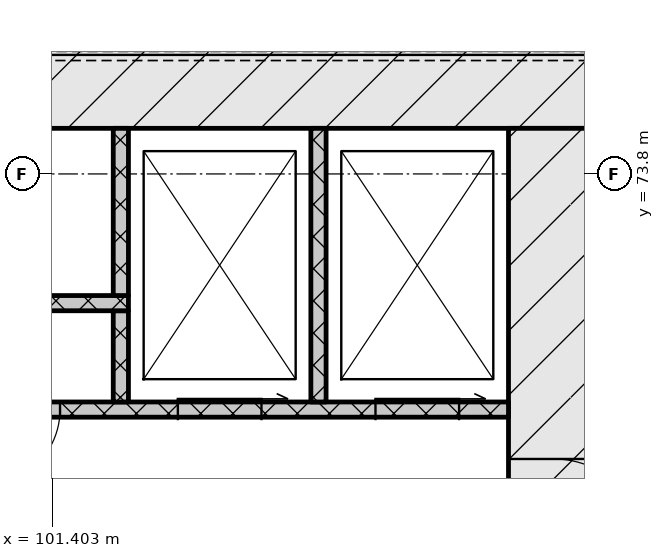
"""IFC4 building model, lengths in metres.
Left out: names, types, materials, properties, quantities, classifications, styles, units other than length and angle.
Written with IfcOpenShell. Run it as: python <this file> out.ifc"""

import sys

from ifc_helpers import new_model, si_unit, direction, frame, frame_2d, origin, place, context, subcontext, project, spatial, rectangle, extrude, element, fill, save


model = new_model("IFC4")
c1 = context("Model", 3, precision=1e-05, world=origin(), true_north=direction((0.0, 1.0)))
c2 = subcontext(c1, "Body", "Model", "MODEL_VIEW")
j1 = project(units=[si_unit("LENGTHUNIT", "METRE"), si_unit("PLANEANGLEUNIT", "RADIAN")], contexts=[c1])
p1 = place(None, origin())
s1 = spatial("IfcSite", under=j1, at=p1, CompositionType="ELEMENT")
p2 = place(p1, origin())
s2 = spatial("IfcBuilding", under=s1, at=p2, CompositionType="ELEMENT")
p3 = place(p2, frame((0.0, 0.0, 44.4)))
s3 = spatial("IfcBuildingStorey", under=s2, at=p3, CompositionType="ELEMENT", Elevation=44.4)
p4 = place(p3, frame((66.6, 75.0, 0.0), z_axis=(0.0, 0.0, 1.0), x_axis=(1.0, 0.0, 0.0)))
e1 = element("IfcWall", 1, at=p4, inside=s3, PredefinedType="SOLIDWALL", context=c2, shape_type="SweptSolid", body=[
    extrude(rectangle(XDim=42.0, YDim=1.2, at=frame_2d((21.0, 0.0))), origin(), (0.0, 0.0, 1.0), 3.32),
])
p5 = place(p3, frame((108.0, 62.4, 0.0), z_axis=(0.0, 0.0, 1.0), x_axis=(0.0, 1.0, 0.0)))
e2 = element("IfcWall", 2, at=p5, inside=s3, PredefinedType="SOLIDWALL", context=c2, shape_type="SweptSolid", body=[
    extrude(rectangle(XDim=12.0, YDim=1.2, at=frame_2d((6.0, 0.0))), origin(), (0.0, 0.0, 1.0), 3.32),
])
p6 = place(p5, frame((6.45, 0.0, 0.0)))
e3 = element("IfcOpeningElement", 3, at=p6, cuts=e2, PredefinedType="OPENING", context=c2, shape_type="SweptSolid", body=[
    extrude(rectangle(XDim=1.2, YDim=2.1, at=frame_2d((0.6, 1.05))), frame((0.0, 0.61, 0.0), z_axis=(0.0, -1.0, 0.0), x_axis=(1.0, 0.0, 0.0)), (0.0, 0.0, 1.0), 1.22),
])
p7 = place(p3, frame((67.8, 70.7, 0.0), z_axis=(0.0, 0.0, 1.0), x_axis=(1.0, 0.0, 0.0)))
e4 = element("IfcWall", 4, at=p7, inside=s3, PredefinedType="SOLIDWALL", context=c2, shape_type="SweptSolid", body=[
    extrude(rectangle(XDim=39.6, YDim=0.2, at=frame_2d((19.8, 0.0))), origin(), (0.0, 0.0, 1.0), 3.32),
])
p8 = place(p7, frame((0.65, 0.0, 0.0)))
e5 = element("IfcOpeningElement", 5, at=p8, cuts=e4, PredefinedType="OPENING", context=c2, shape_type="SweptSolid", body=[
    extrude(rectangle(XDim=1.1, YDim=2.1, at=frame_2d((0.55, 1.05))), frame((0.0, 0.11, 0.0), z_axis=(0.0, -1.0, 0.0), x_axis=(1.0, 0.0, 0.0)), (0.0, 0.0, 1.0), 0.22),
])
p9 = place(p7, frame((3.25, 0.0, 0.0)))
e6 = element("IfcOpeningElement", 6, at=p9, cuts=e4, PredefinedType="OPENING", context=c2, shape_type="SweptSolid", body=[
    extrude(rectangle(XDim=1.1, YDim=2.1, at=frame_2d((0.55, 1.05))), frame((0.0, 0.11, 0.0), z_axis=(0.0, -1.0, 0.0), x_axis=(1.0, 0.0, 0.0)), (0.0, 0.0, 1.0), 0.22),
])
p10 = place(p7, frame((5.9, 0.0, 0.0)))
e7 = element("IfcOpeningElement", 7, at=p10, cuts=e4, PredefinedType="OPENING", context=c2, shape_type="SweptSolid", body=[
    extrude(rectangle(XDim=1.0, YDim=2.1, at=frame_2d((0.5, 1.05))), frame((0.0, 0.11, 0.0), z_axis=(0.0, -1.0, 0.0), x_axis=(1.0, 0.0, 0.0)), (0.0, 0.0, 1.0), 0.22),
])
p11 = place(p7, frame((21.7, 0.0, 0.0)))
e8 = element("IfcOpeningElement", 8, at=p11, cuts=e4, PredefinedType="OPENING", context=c2, shape_type="SweptSolid", body=[
    extrude(rectangle(XDim=1.0, YDim=2.1, at=frame_2d((0.5, 1.05))), frame((0.0, 0.11, 0.0), z_axis=(0.0, -1.0, 0.0), x_axis=(1.0, 0.0, 0.0)), (0.0, 0.0, 1.0), 0.22),
])
p12 = place(p7, frame((32.7, 0.0, 0.0)))
e9 = element("IfcOpeningElement", 9, at=p12, cuts=e4, PredefinedType="OPENING", context=c2, shape_type="SweptSolid", body=[
    extrude(rectangle(XDim=1.0, YDim=2.1, at=frame_2d((0.5, 1.05))), frame((0.0, 0.11, 0.0), z_axis=(0.0, -1.0, 0.0), x_axis=(1.0, 0.0, 0.0)), (0.0, 0.0, 1.0), 0.22),
])
p13 = place(p7, frame((35.25, 0.0, 0.0)))
e10 = element("IfcOpeningElement", 10, at=p13, cuts=e4, PredefinedType="OPENING", context=c2, shape_type="SweptSolid", body=[
    extrude(rectangle(XDim=1.1, YDim=2.1, at=frame_2d((0.55, 1.05))), frame((0.0, 0.11, 0.0), z_axis=(0.0, -1.0, 0.0), x_axis=(1.0, 0.0, 0.0)), (0.0, 0.0, 1.0), 0.22),
])
p14 = place(p7, frame((37.85, 0.0, 0.0)))
e11 = element("IfcOpeningElement", 11, at=p14, cuts=e4, PredefinedType="OPENING", context=c2, shape_type="SweptSolid", body=[
    extrude(rectangle(XDim=1.1, YDim=2.1, at=frame_2d((0.55, 1.05))), frame((0.0, 0.11, 0.0), z_axis=(0.0, -1.0, 0.0), x_axis=(1.0, 0.0, 0.0)), (0.0, 0.0, 1.0), 0.22),
])
p15 = place(p3, frame((102.3, 70.8, 0.0), z_axis=(0.0, 0.0, 1.0), x_axis=(0.0, 1.0, 0.0)))
e12 = element("IfcWall", 12, at=p15, inside=s3, PredefinedType="SOLIDWALL", context=c2, shape_type="SweptSolid", body=[
    extrude(rectangle(XDim=1.2, YDim=0.2, at=frame_2d((0.6, 0.0))), origin(), (0.0, 0.0, 1.0), 3.32),
])
p16 = place(p3, frame((104.9, 70.8, 0.0), z_axis=(0.0, 0.0, 1.0), x_axis=(0.0, 1.0, 0.0)))
e13 = element("IfcWall", 13, at=p16, inside=s3, PredefinedType="SOLIDWALL", context=c2, shape_type="SweptSolid", body=[
    extrude(rectangle(XDim=3.6, YDim=0.2, at=frame_2d((1.8, 0.0))), origin(), (0.0, 0.0, 1.0), 3.32),
])
p17 = place(p3, frame((93.28, 72.1, 0.0), z_axis=(0.0, 0.0, 1.0), x_axis=(1.0, 0.0, 0.0)))
e14 = element("IfcWall", 14, at=p17, inside=s3, PredefinedType="SOLIDWALL", context=c2, shape_type="SweptSolid", body=[
    extrude(rectangle(XDim=9.12, YDim=0.2, at=frame_2d((4.56, 0.0))), origin(), (0.0, 0.0, 1.0), 3.32),
])
p18 = place(p17, frame((0.87, 0.0, 0.0)))
e15 = element("IfcOpeningElement", 15, at=p18, cuts=e14, PredefinedType="OPENING", context=c2, shape_type="SweptSolid", body=[
    extrude(rectangle(XDim=0.9, YDim=2.1, at=frame_2d((0.45, 1.05))), frame((0.0, 0.11, 0.0), z_axis=(0.0, -1.0, 0.0), x_axis=(1.0, 0.0, 0.0)), (0.0, 0.0, 1.0), 0.22),
])
p19 = place(p17, frame((3.73, 0.0, 0.0)))
e16 = element("IfcOpeningElement", 16, at=p19, cuts=e14, PredefinedType="OPENING", context=c2, shape_type="SweptSolid", body=[
    extrude(rectangle(XDim=0.9, YDim=2.1, at=frame_2d((0.45, 1.05))), frame((0.0, 0.11, 0.0), z_axis=(0.0, -1.0, 0.0), x_axis=(1.0, 0.0, 0.0)), (0.0, 0.0, 1.0), 0.22),
])
p20 = place(p17, frame((6.97, 0.0, 0.0)))
e17 = element("IfcOpeningElement", 17, at=p20, cuts=e14, PredefinedType="OPENING", context=c2, shape_type="SweptSolid", body=[
    extrude(rectangle(XDim=0.9, YDim=2.1, at=frame_2d((0.45, 1.05))), frame((0.0, 0.11, 0.0), z_axis=(0.0, -1.0, 0.0), x_axis=(1.0, 0.0, 0.0)), (0.0, 0.0, 1.0), 0.22),
])
p21 = place(p3, frame((102.3, 72.2, 0.0), z_axis=(0.0, 0.0, 1.0), x_axis=(0.0, 1.0, 0.0)))
e18 = element("IfcWall", 18, at=p21, inside=s3, PredefinedType="SOLIDWALL", context=c2, shape_type="SweptSolid", body=[
    extrude(rectangle(XDim=2.2, YDim=0.2, at=frame_2d((1.1, 0.0))), origin(), (0.0, 0.0, 1.0), 3.32),
])
p22 = place(p6, origin())
e19 = element("IfcDoor", 19, at=p22, inside=s3, OperationType="SINGLE_SWING_RIGHT", PredefinedType="DOOR", context=c2, shape_type="SweptSolid", body=[
    extrude(rectangle(XDim=1.2, YDim=2.1, at=frame_2d((0.6, 1.05))), frame((0.0, 0.025, 0.0), z_axis=(0.0, -1.0, 0.0), x_axis=(1.0, 0.0, 0.0)), (0.0, 0.0, 1.0), 0.05),
])
fill(e3, e19)
p23 = place(p12, origin())
e20 = element("IfcDoor", 20, at=p23, inside=s3, OperationType="SINGLE_SWING_RIGHT", PredefinedType="DOOR", context=c2, shape_type="SweptSolid", body=[
    extrude(rectangle(XDim=1.0, YDim=2.1, at=frame_2d((0.5, 1.05))), frame((0.0, 0.025, 0.0), z_axis=(0.0, -1.0, 0.0), x_axis=(1.0, 0.0, 0.0)), (0.0, 0.0, 1.0), 0.05),
])
fill(e9, e20)
p24 = place(p13, origin())
e21 = element("IfcDoor", 21, at=p24, inside=s3, OperationType="SLIDING_TO_RIGHT", PredefinedType="DOOR", context=c2, shape_type="SweptSolid", body=[
    extrude(rectangle(XDim=1.1, YDim=2.1, at=frame_2d((0.55, 1.05))), frame((0.0, 0.025, 0.0), z_axis=(0.0, -1.0, 0.0), x_axis=(1.0, 0.0, 0.0)), (0.0, 0.0, 1.0), 0.05),
])
fill(e10, e21)
p25 = place(p14, origin())
e22 = element("IfcDoor", 22, at=p25, inside=s3, OperationType="SLIDING_TO_RIGHT", PredefinedType="DOOR", context=c2, shape_type="SweptSolid", body=[
    extrude(rectangle(XDim=1.1, YDim=2.1, at=frame_2d((0.55, 1.05))), frame((0.0, 0.025, 0.0), z_axis=(0.0, -1.0, 0.0), x_axis=(1.0, 0.0, 0.0)), (0.0, 0.0, 1.0), 0.05),
])
fill(e11, e22)
save(model, sys.argv[1])
